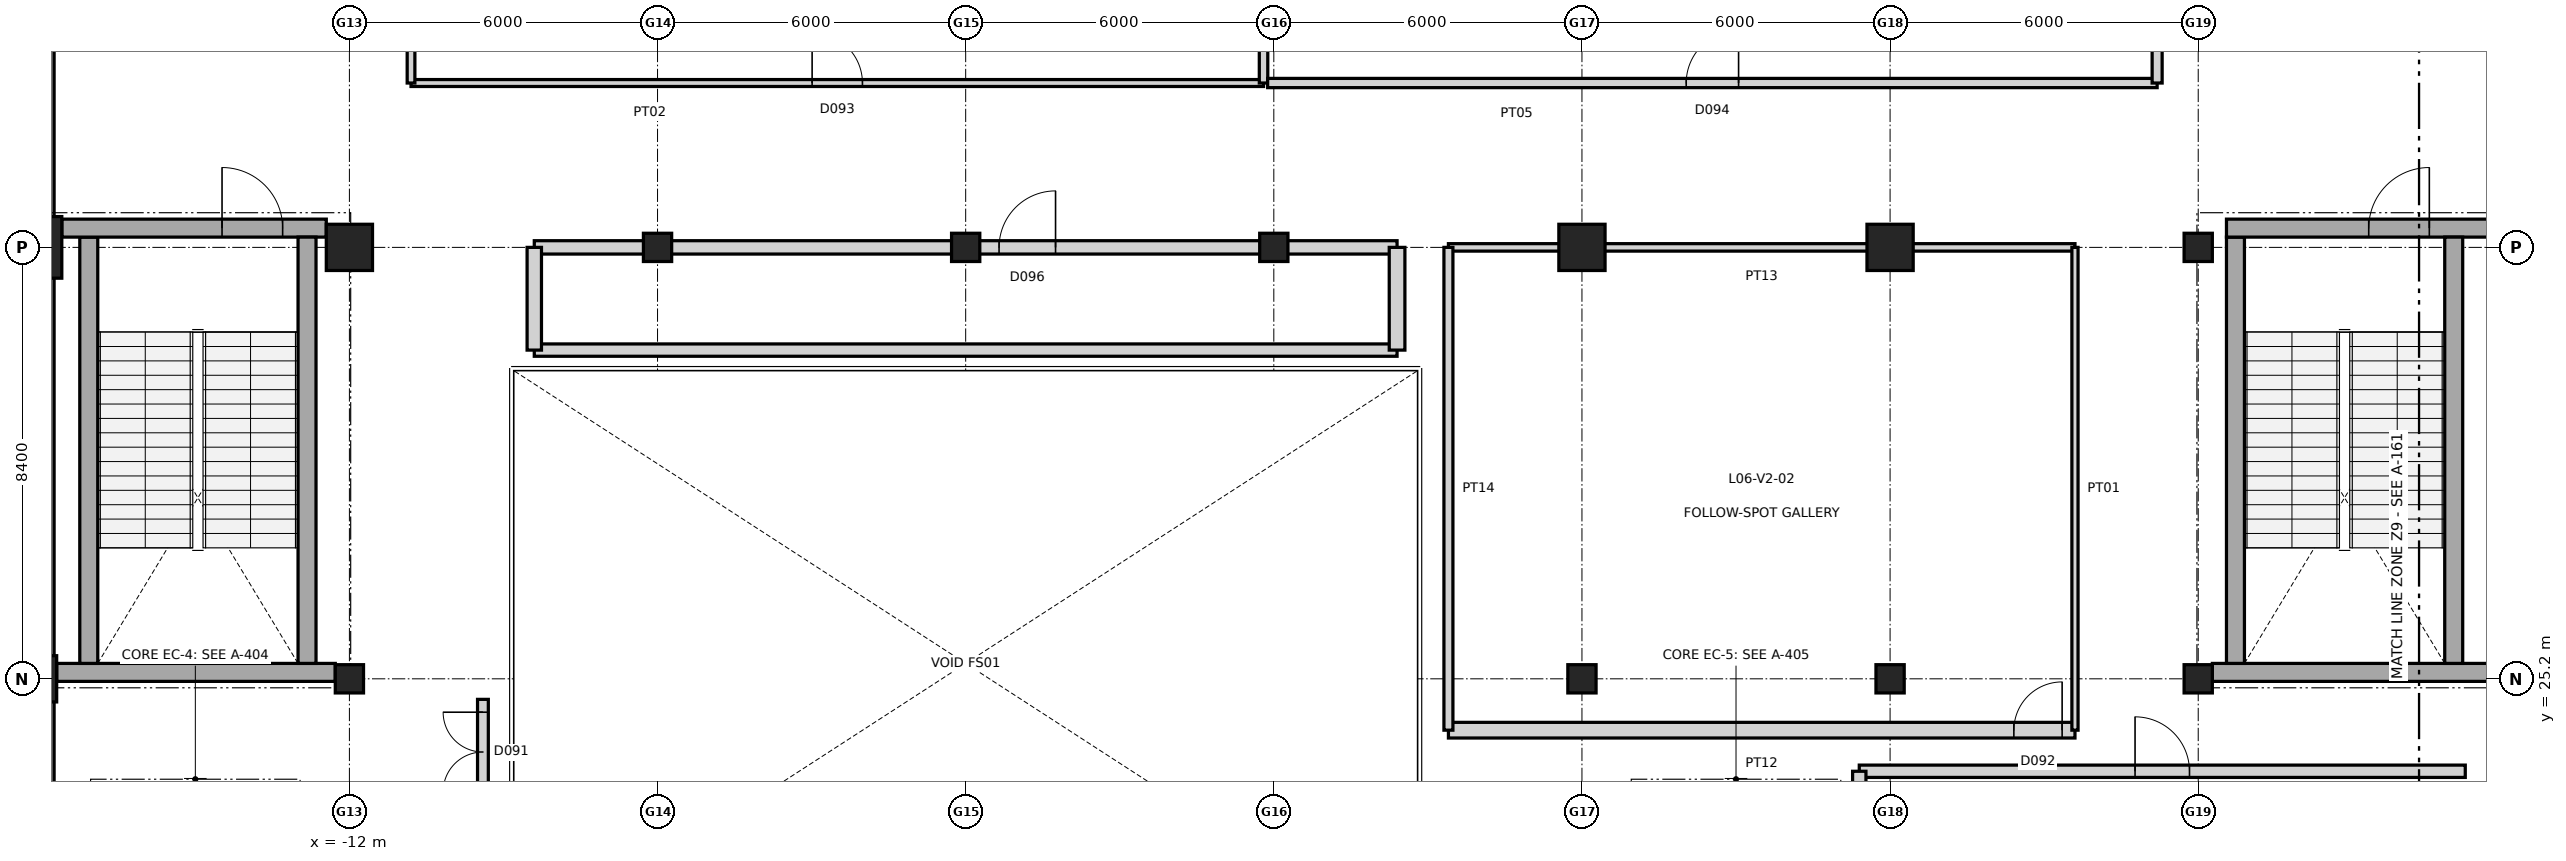
"""IFC4 building model, lengths in metres.
Left out: names, types, materials, properties, quantities, classifications, styles, units other than length and angle.
Written with IfcOpenShell. Run it as: python <this file> out.ifc"""

import sys

from ifc_helpers import new_model, si_unit, direction, frame, frame_2d, origin, origin_2d, place, context, subcontext, project, spatial, rectangle, extrude, element, fill, save


model = new_model("IFC4")
c1 = context("Model", 3, precision=1e-05, world=origin(), true_north=direction((0.0, 1.0)))
c2 = subcontext(c1, "Body", "Model", "MODEL_VIEW")
j1 = project(units=[si_unit("LENGTHUNIT", "METRE"), si_unit("PLANEANGLEUNIT", "RADIAN")], contexts=[c1])
p1 = place(None, origin())
s1 = spatial("IfcSite", under=j1, at=p1, CompositionType="ELEMENT")
p2 = place(p1, origin())
s2 = spatial("IfcBuilding", under=s1, at=p2, CompositionType="ELEMENT")
p3 = place(p2, frame((0.0, 0.0, 30.0)))
s3 = spatial("IfcBuildingStorey", under=s2, at=p3, CompositionType="ELEMENT", Elevation=30.0)
p4 = place(p3, frame((-18.0, 25.2, 0.0), z_axis=(0.0, 0.0, 1.0), x_axis=(1.0, 0.0, 0.0)))
e1 = element("IfcColumn", 1, at=p4, inside=s3, PredefinedType="COLUMN", context=c2, shape_type="SweptSolid", body=[
    extrude(rectangle(XDim=0.6, YDim=0.9, at=origin_2d()), origin(), (0.0, 0.0, 1.0), 6.0),
])
p5 = place(p3, frame((-18.0, 33.6, 0.0), z_axis=(0.0, 0.0, 1.0), x_axis=(1.0, 0.0, 0.0)))
e2 = element("IfcColumn", 2, at=p5, inside=s3, PredefinedType="COLUMN", context=c2, shape_type="SweptSolid", body=[
    extrude(rectangle(XDim=0.8, YDim=1.2, at=origin_2d()), origin(), (0.0, 0.0, 1.0), 6.0),
])
p6 = place(p3, frame((-12.0, 25.2, 0.0), z_axis=(0.0, 0.0, 1.0), x_axis=(1.0, 0.0, 0.0)))
e3 = element("IfcColumn", 3, at=p6, inside=s3, PredefinedType="COLUMN", context=c2, shape_type="SweptSolid", body=[
    extrude(rectangle(XDim=0.55, YDim=0.55, at=origin_2d()), origin(), (0.0, 0.0, 1.0), 6.0),
])
p7 = place(p3, frame((-12.0, 33.6, 0.0), z_axis=(0.0, 0.0, 1.0), x_axis=(1.0, 0.0, 0.0)))
e4 = element("IfcColumn", 4, at=p7, inside=s3, PredefinedType="COLUMN", context=c2, shape_type="SweptSolid", body=[
    extrude(rectangle(XDim=0.9, YDim=0.9, at=origin_2d()), origin(), (0.0, 0.0, 1.0), 6.0),
])
for number, where, z_axis, x_axis in (
    (5, (-6.0, 33.6, 0.0), (0.0, 0.0, 1.0), (1.0, 0.0, 0.0)),
    (6, (0.0, 33.6, 0.0), (0.0, 0.0, 1.0), (1.0, 0.0, 0.0)),
    (7, (6.0, 33.6, 0.0), (0.0, 0.0, 1.0), (1.0, 0.0, 0.0)),
    (8, (12.0, 25.2, 0.0), (0.0, 0.0, 1.0), (1.0, 0.0, 0.0)),
):
    element("IfcColumn", number, at=place(p3, frame(where, z_axis=z_axis, x_axis=x_axis)), inside=s3, PredefinedType="COLUMN", context=c2, shape_type="SweptSolid", body=[
        extrude(rectangle(XDim=0.55, YDim=0.55, at=origin_2d()), origin(), (0.0, 0.0, 1.0), 6.0),
    ])
p8 = place(p3, frame((12.0, 33.6, 0.0), z_axis=(0.0, 0.0, 1.0), x_axis=(1.0, 0.0, 0.0)))
e9 = element("IfcColumn", 9, at=p8, inside=s3, PredefinedType="COLUMN", context=c2, shape_type="SweptSolid", body=[
    extrude(rectangle(XDim=0.9, YDim=0.9, at=origin_2d()), origin(), (0.0, 0.0, 1.0), 6.0),
])
p9 = place(p3, frame((18.0, 25.2, 0.0), z_axis=(0.0, 0.0, 1.0), x_axis=(1.0, 0.0, 0.0)))
e10 = element("IfcColumn", 10, at=p9, inside=s3, PredefinedType="COLUMN", context=c2, shape_type="SweptSolid", body=[
    extrude(rectangle(XDim=0.55, YDim=0.55, at=origin_2d()), origin(), (0.0, 0.0, 1.0), 6.0),
])
p10 = place(p3, frame((18.0, 33.6, 0.0), z_axis=(0.0, 0.0, 1.0), x_axis=(1.0, 0.0, 0.0)))
e11 = element("IfcColumn", 11, at=p10, inside=s3, PredefinedType="COLUMN", context=c2, shape_type="SweptSolid", body=[
    extrude(rectangle(XDim=0.9, YDim=0.9, at=origin_2d()), origin(), (0.0, 0.0, 1.0), 6.0),
])
for number, where, z_axis, x_axis in (
    (12, (24.0, 25.2, 0.0), (0.0, 0.0, 1.0), (1.0, 0.0, 0.0)),
    (13, (24.0, 33.6, 0.0), (0.0, 0.0, 1.0), (1.0, 0.0, 0.0)),
):
    element("IfcColumn", number, at=place(p3, frame(where, z_axis=z_axis, x_axis=x_axis)), inside=s3, PredefinedType="COLUMN", context=c2, shape_type="SweptSolid", body=[
        extrude(rectangle(XDim=0.55, YDim=0.55, at=origin_2d()), origin(), (0.0, 0.0, 1.0), 6.0),
    ])
p11 = place(p3, frame((-18.0, 18.0, 0.0), z_axis=(0.0, 0.0, 1.0), x_axis=(0.0, 1.0, 0.0)))
e14 = element("IfcWall", 14, at=p11, inside=s3, PredefinedType="SHEAR", context=c2, shape_type="SweptSolid", body=[
    extrude(rectangle(XDim=23.55, YDim=0.5, at=frame_2d((11.775, 0.0))), origin(), (0.0, 0.0, 1.0), 6.0),
])
p12 = place(p3, frame((-12.275, 25.325, 0.0), z_axis=(0.0, 0.0, 1.0), x_axis=(-1.0, 0.0, 0.0)))
e15 = element("IfcWall", 15, at=p12, inside=s3, PredefinedType="SHEAR", context=c2, shape_type="SweptSolid", body=[
    extrude(rectangle(XDim=5.425, YDim=0.35, at=frame_2d((2.712, 0.0))), origin(), (0.0, 0.0, 1.0), 6.0),
])
p13 = place(p3, frame((-17.075, 25.5, 0.0), z_axis=(0.0, 0.0, 1.0), x_axis=(0.0, 1.0, 0.0)))
e16 = element("IfcWall", 16, at=p13, inside=s3, PredefinedType="SHEAR", context=c2, shape_type="SweptSolid", body=[
    extrude(rectangle(XDim=8.3, YDim=0.35, at=frame_2d((4.15, 0.0))), origin(), (0.0, 0.0, 1.0), 6.0),
])
p14 = place(p3, frame((-17.6, 33.975, 0.0), z_axis=(0.0, 0.0, 1.0), x_axis=(1.0, 0.0, 0.0)))
e17 = element("IfcWall", 17, at=p14, inside=s3, PredefinedType="SHEAR", context=c2, shape_type="SweptSolid", body=[
    extrude(rectangle(XDim=5.15, YDim=0.35, at=frame_2d((2.575, 0.0))), origin(), (0.0, 0.0, 1.0), 6.0),
])
p15 = place(p14, frame((3.12, 0.0, 0.0)))
e18 = element("IfcOpeningElement", 18, at=p15, cuts=e17, PredefinedType="OPENING", context=c2, shape_type="SweptSolid", body=[
    extrude(rectangle(XDim=1.18, YDim=2.15, at=frame_2d((0.59, 1.075))), frame((0.0, 0.185, 0.0), z_axis=(0.0, -1.0, 0.0), x_axis=(1.0, 0.0, 0.0)), (0.0, 0.0, 1.0), 0.37),
])
p16 = place(p3, frame((-12.825, 33.8, 0.0), z_axis=(0.0, 0.0, 1.0), x_axis=(0.0, -1.0, 0.0)))
e19 = element("IfcWall", 19, at=p16, inside=s3, PredefinedType="SHEAR", context=c2, shape_type="SweptSolid", body=[
    extrude(rectangle(XDim=8.3, YDim=0.35, at=frame_2d((4.15, 0.0))), origin(), (0.0, 0.0, 1.0), 6.0),
])
p17 = place(p3, frame((29.7, 25.325, 0.0), z_axis=(0.0, 0.0, 1.0), x_axis=(-1.0, 0.0, 0.0)))
e20 = element("IfcWall", 20, at=p17, inside=s3, PredefinedType="SHEAR", context=c2, shape_type="SweptSolid", body=[
    extrude(rectangle(XDim=5.425, YDim=0.35, at=frame_2d((2.712, 0.0))), origin(), (0.0, 0.0, 1.0), 6.0),
])
p18 = place(p3, frame((24.725, 25.5, 0.0), z_axis=(0.0, 0.0, 1.0), x_axis=(0.0, 1.0, 0.0)))
e21 = element("IfcWall", 21, at=p18, inside=s3, PredefinedType="SHEAR", context=c2, shape_type="SweptSolid", body=[
    extrude(rectangle(XDim=8.3, YDim=0.35, at=frame_2d((4.15, 0.0))), origin(), (0.0, 0.0, 1.0), 6.0),
])
p19 = place(p3, frame((24.55, 33.975, 0.0), z_axis=(0.0, 0.0, 1.0), x_axis=(1.0, 0.0, 0.0)))
e22 = element("IfcWall", 22, at=p19, inside=s3, PredefinedType="SHEAR", context=c2, shape_type="SweptSolid", body=[
    extrude(rectangle(XDim=5.15, YDim=0.35, at=frame_2d((2.575, 0.0))), origin(), (0.0, 0.0, 1.0), 6.0),
])
p20 = place(p19, frame((2.77, 0.0, 0.0)))
e23 = element("IfcOpeningElement", 23, at=p20, cuts=e22, PredefinedType="OPENING", context=c2, shape_type="SweptSolid", body=[
    extrude(rectangle(XDim=1.18, YDim=2.15, at=frame_2d((0.59, 1.075))), frame((0.0, 0.185, 0.0), z_axis=(0.0, -1.0, 0.0), x_axis=(1.0, 0.0, 0.0)), (0.0, 0.0, 1.0), 0.37),
])
p21 = place(p3, frame((28.975, 33.8, 0.0), z_axis=(0.0, 0.0, 1.0), x_axis=(0.0, -1.0, 0.0)))
e24 = element("IfcWall", 24, at=p21, inside=s3, PredefinedType="SHEAR", context=c2, shape_type="SweptSolid", body=[
    extrude(rectangle(XDim=8.3, YDim=0.35, at=frame_2d((4.15, 0.0))), origin(), (0.0, 0.0, 1.0), 6.0),
])
p22 = place(p3, frame((-9.4, 18.2, 0.0), z_axis=(0.0, 0.0, 1.0), x_axis=(0.0, 1.0, 0.0)))
e25 = element("IfcWall", 25, at=p22, inside=s3, PredefinedType="PARTITIONING", context=c2, shape_type="SweptSolid", body=[
    extrude(rectangle(XDim=6.6, YDim=0.21, at=frame_2d((3.3, 0.0))), origin(), (0.0, 0.0, 1.0), 5.62),
])
p23 = place(p22, frame((4.8, 0.0, 0.0)))
e26 = element("IfcOpeningElement", 26, at=p23, cuts=e25, PredefinedType="OPENING", context=c2, shape_type="SweptSolid", body=[
    extrude(rectangle(XDim=1.55, YDim=2.2, at=frame_2d((0.775, 1.1))), frame((0.0, 0.115, 0.0), z_axis=(0.0, -1.0, 0.0), x_axis=(1.0, 0.0, 0.0)), (0.0, 0.0, 1.0), 0.23),
])
p24 = place(p3, frame((9.4, 24.2, 0.0), z_axis=(0.0, 0.0, 1.0), x_axis=(1.0, 0.0, 0.0)))
e27 = element("IfcWall", 27, at=p24, inside=s3, PredefinedType="PARTITIONING", context=c2, shape_type="SweptSolid", body=[
    extrude(rectangle(XDim=12.2, YDim=0.305, at=frame_2d((6.1, 0.0))), origin(), (0.0, 0.0, 1.0), 5.62),
])
p25 = place(p24, frame((11.01, 0.0, 0.0)))
e28 = element("IfcOpeningElement", 28, at=p25, cuts=e27, PredefinedType="OPENING", context=c2, shape_type="SweptSolid", body=[
    extrude(rectangle(XDim=0.94, YDim=2.1, at=frame_2d((0.47, 1.05))), frame((0.0, 0.162, 0.0), z_axis=(0.0, -1.0, 0.0), x_axis=(1.0, 0.0, 0.0)), (0.0, 0.0, 1.0), 0.325),
])
p26 = place(p3, frame((9.4, 33.6, 0.0), z_axis=(0.0, 0.0, 1.0), x_axis=(1.0, 0.0, 0.0)))
e29 = element("IfcWall", 29, at=p26, inside=s3, PredefinedType="PARTITIONING", context=c2, shape_type="SweptSolid", body=[
    extrude(rectangle(XDim=12.2, YDim=0.145, at=frame_2d((6.1, 0.0))), origin(), (0.0, 0.0, 1.0), 5.012),
])
p27 = place(p3, frame((9.4, 24.2, 0.0), z_axis=(0.0, 0.0, 1.0), x_axis=(0.0, 1.0, 0.0)))
e30 = element("IfcWall", 30, at=p27, inside=s3, PredefinedType="PARTITIONING", context=c2, shape_type="SweptSolid", body=[
    extrude(rectangle(XDim=9.4, YDim=0.175, at=frame_2d((4.7, 0.0))), origin(), (0.0, 0.0, 1.0), 5.62),
])
p28 = place(p3, frame((21.6, 24.2, 0.0), z_axis=(0.0, 0.0, 1.0), x_axis=(0.0, 1.0, 0.0)))
e31 = element("IfcWall", 31, at=p28, inside=s3, PredefinedType="PARTITIONING", context=c2, shape_type="SweptSolid", body=[
    extrude(rectangle(XDim=9.4, YDim=0.12, at=frame_2d((4.7, 0.0))), origin(), (0.0, 0.0, 1.0), 5.62),
])
p29 = place(p3, frame((-10.8, 36.8, 0.0), z_axis=(0.0, 0.0, 1.0), x_axis=(1.0, 0.0, 0.0)))
e32 = element("IfcWall", 32, at=p29, inside=s3, PredefinedType="PARTITIONING", context=c2, shape_type="SweptSolid", body=[
    extrude(rectangle(XDim=16.6, YDim=0.135, at=frame_2d((8.3, 0.0))), origin(), (0.0, 0.0, 1.0), 5.62),
])
p30 = place(p29, frame((7.81, 0.0, 0.0)))
e33 = element("IfcOpeningElement", 33, at=p30, cuts=e32, PredefinedType="OPENING", context=c2, shape_type="SweptSolid", body=[
    extrude(rectangle(XDim=0.98, YDim=2.15, at=frame_2d((0.49, 1.075))), frame((0.0, 0.077, 0.0), z_axis=(0.0, -1.0, 0.0), x_axis=(1.0, 0.0, 0.0)), (0.0, 0.0, 1.0), 0.155),
])
p31 = place(p3, frame((-10.8, 36.8, 0.0), z_axis=(0.0, 0.0, 1.0), x_axis=(0.0, 1.0, 0.0)))
e34 = element("IfcWall", 34, at=p31, inside=s3, PredefinedType="PARTITIONING", context=c2, shape_type="SweptSolid", body=[
    extrude(rectangle(XDim=4.4, YDim=0.15, at=frame_2d((2.2, 0.0))), origin(), (0.0, 0.0, 1.0), 5.62),
])
p32 = place(p3, frame((5.8, 36.8, 0.0), z_axis=(0.0, 0.0, 1.0), x_axis=(0.0, 1.0, 0.0)))
e35 = element("IfcWall", 35, at=p32, inside=s3, PredefinedType="PARTITIONING", context=c2, shape_type="SweptSolid", body=[
    extrude(rectangle(XDim=4.4, YDim=0.165, at=frame_2d((2.2, 0.0))), origin(), (0.0, 0.0, 1.0), 4.79),
])
p33 = place(p3, frame((5.88, 36.8, 0.0), z_axis=(0.0, 0.0, 1.0), x_axis=(1.0, 0.0, 0.0)))
e36 = element("IfcWall", 36, at=p33, inside=s3, PredefinedType="PARTITIONING", context=c2, shape_type="SweptSolid", body=[
    extrude(rectangle(XDim=17.32, YDim=0.18, at=frame_2d((8.66, 0.0))), origin(), (0.0, 0.0, 1.0), 5.62),
])
p34 = place(p33, frame((8.15, 0.0, 0.0)))
e37 = element("IfcOpeningElement", 37, at=p34, cuts=e36, PredefinedType="OPENING", context=c2, shape_type="SweptSolid", body=[
    extrude(rectangle(XDim=1.02, YDim=2.15, at=frame_2d((0.51, 1.075))), frame((0.0, 0.1, 0.0), z_axis=(0.0, -1.0, 0.0), x_axis=(1.0, 0.0, 0.0)), (0.0, 0.0, 1.0), 0.2),
])
p35 = place(p3, frame((23.2, 36.8, 0.0), z_axis=(0.0, 0.0, 1.0), x_axis=(0.0, 1.0, 0.0)))
e38 = element("IfcWall", 38, at=p35, inside=s3, PredefinedType="PARTITIONING", context=c2, shape_type="SweptSolid", body=[
    extrude(rectangle(XDim=4.4, YDim=0.195, at=frame_2d((2.2, 0.0))), origin(), (0.0, 0.0, 1.0), 5.62),
])
p36 = place(p3, frame((17.4, 23.4, 0.0), z_axis=(0.0, 0.0, 1.0), x_axis=(1.0, 0.0, 0.0)))
e39 = element("IfcWall", 39, at=p36, inside=s3, PredefinedType="PARTITIONING", context=c2, shape_type="SweptSolid", body=[
    extrude(rectangle(XDim=11.8, YDim=0.24, at=frame_2d((5.9, 0.0))), origin(), (0.0, 0.0, 1.0), 5.62),
])
p37 = place(p36, frame((5.37, 0.0, 0.0)))
e40 = element("IfcOpeningElement", 40, at=p37, cuts=e39, PredefinedType="OPENING", context=c2, shape_type="SweptSolid", body=[
    extrude(rectangle(XDim=1.06, YDim=2.15, at=frame_2d((0.53, 1.075))), frame((0.0, 0.13, 0.0), z_axis=(0.0, -1.0, 0.0), x_axis=(1.0, 0.0, 0.0)), (0.0, 0.0, 1.0), 0.26),
])
p38 = place(p3, frame((17.4, 18.2, 0.0), z_axis=(0.0, 0.0, 1.0), x_axis=(0.0, 1.0, 0.0)))
e41 = element("IfcWall", 41, at=p38, inside=s3, PredefinedType="PARTITIONING", context=c2, shape_type="SweptSolid", body=[
    extrude(rectangle(XDim=5.2, YDim=0.26, at=frame_2d((2.6, 0.0))), origin(), (0.0, 0.0, 1.0), 5.62),
])
p39 = place(p3, frame((-8.4, 31.6, 0.0), z_axis=(0.0, 0.0, 1.0), x_axis=(1.0, 0.0, 0.0)))
e42 = element("IfcWall", 42, at=p39, inside=s3, PredefinedType="PARTITIONING", context=c2, shape_type="SweptSolid", body=[
    extrude(rectangle(XDim=16.8, YDim=0.24, at=frame_2d((8.4, 0.0))), origin(), (0.0, 0.0, 1.0), 5.62),
])
p40 = place(p3, frame((-8.4, 33.6, 0.0), z_axis=(0.0, 0.0, 1.0), x_axis=(1.0, 0.0, 0.0)))
e43 = element("IfcWall", 43, at=p40, inside=s3, PredefinedType="PARTITIONING", context=c2, shape_type="SweptSolid", body=[
    extrude(rectangle(XDim=16.8, YDim=0.26, at=frame_2d((8.4, 0.0))), origin(), (0.0, 0.0, 1.0), 3.99),
])
p41 = place(p40, frame((9.05, 0.0, 0.0)))
e44 = element("IfcOpeningElement", 44, at=p41, cuts=e43, PredefinedType="OPENING", context=c2, shape_type="SweptSolid", body=[
    extrude(rectangle(XDim=1.1, YDim=2.2, at=frame_2d((0.55, 1.1))), frame((0.0, 0.14, 0.0), z_axis=(0.0, -1.0, 0.0), x_axis=(1.0, 0.0, 0.0)), (0.0, 0.0, 1.0), 0.28),
])
p42 = place(p3, frame((-8.4, 31.6, 0.0), z_axis=(0.0, 0.0, 1.0), x_axis=(0.0, 1.0, 0.0)))
e45 = element("IfcWall", 45, at=p42, inside=s3, PredefinedType="PARTITIONING", context=c2, shape_type="SweptSolid", body=[
    extrude(rectangle(XDim=2.0, YDim=0.28, at=frame_2d((1.0, 0.0))), origin(), (0.0, 0.0, 1.0), 5.62),
])
p43 = place(p3, frame((8.4, 31.6, 0.0), z_axis=(0.0, 0.0, 1.0), x_axis=(0.0, 1.0, 0.0)))
e46 = element("IfcWall", 46, at=p43, inside=s3, PredefinedType="PARTITIONING", context=c2, shape_type="SweptSolid", body=[
    extrude(rectangle(XDim=2.0, YDim=0.305, at=frame_2d((1.0, 0.0))), origin(), (0.0, 0.0, 1.0), 5.62),
])
p44 = place(p15, origin())
e47 = element("IfcDoor", 47, at=p44, inside=s3, OperationType="SINGLE_SWING_LEFT", PredefinedType="DOOR", context=c2, shape_type="SweptSolid", body=[
    extrude(rectangle(XDim=1.18, YDim=2.15, at=frame_2d((0.59, 1.075))), frame((0.0, 0.025, 0.0), z_axis=(0.0, -1.0, 0.0), x_axis=(1.0, 0.0, 0.0)), (0.0, 0.0, 1.0), 0.05),
])
fill(e18, e47)
p45 = place(p20, origin())
e48 = element("IfcDoor", 48, at=p45, inside=s3, OperationType="SINGLE_SWING_RIGHT", PredefinedType="DOOR", context=c2, shape_type="SweptSolid", body=[
    extrude(rectangle(XDim=1.18, YDim=2.15, at=frame_2d((0.59, 1.075))), frame((0.0, 0.025, 0.0), z_axis=(0.0, -1.0, 0.0), x_axis=(1.0, 0.0, 0.0)), (0.0, 0.0, 1.0), 0.05),
])
fill(e23, e48)
p46 = place(p23, origin())
e49 = element("IfcDoor", 49, at=p46, inside=s3, OperationType="DOUBLE_DOOR_SINGLE_SWING", PredefinedType="DOOR", context=c2, shape_type="SweptSolid", body=[
    extrude(rectangle(XDim=1.55, YDim=2.2, at=frame_2d((0.775, 1.1))), frame((0.0, 0.025, 0.0), z_axis=(0.0, -1.0, 0.0), x_axis=(1.0, 0.0, 0.0)), (0.0, 0.0, 1.0), 0.05),
])
fill(e26, e49)
p47 = place(p25, origin())
e50 = element("IfcDoor", 50, at=p47, inside=s3, OperationType="SINGLE_SWING_RIGHT", PredefinedType="DOOR", context=c2, shape_type="SweptSolid", body=[
    extrude(rectangle(XDim=0.94, YDim=2.1, at=frame_2d((0.47, 1.05))), frame((0.0, 0.025, 0.0), z_axis=(0.0, -1.0, 0.0), x_axis=(1.0, 0.0, 0.0)), (0.0, 0.0, 1.0), 0.05),
])
fill(e28, e50)
p48 = place(p30, origin())
e51 = element("IfcDoor", 51, at=p48, inside=s3, OperationType="SINGLE_SWING_LEFT", PredefinedType="DOOR", context=c2, shape_type="SweptSolid", body=[
    extrude(rectangle(XDim=0.98, YDim=2.15, at=frame_2d((0.49, 1.075))), frame((0.0, 0.025, 0.0), z_axis=(0.0, -1.0, 0.0), x_axis=(1.0, 0.0, 0.0)), (0.0, 0.0, 1.0), 0.05),
])
fill(e33, e51)
p49 = place(p34, origin())
e52 = element("IfcDoor", 52, at=p49, inside=s3, OperationType="SINGLE_SWING_RIGHT", PredefinedType="DOOR", context=c2, shape_type="SweptSolid", body=[
    extrude(rectangle(XDim=1.02, YDim=2.15, at=frame_2d((0.51, 1.075))), frame((0.0, 0.025, 0.0), z_axis=(0.0, -1.0, 0.0), x_axis=(1.0, 0.0, 0.0)), (0.0, 0.0, 1.0), 0.05),
])
fill(e37, e52)
p50 = place(p37, origin())
e53 = element("IfcDoor", 53, at=p50, inside=s3, OperationType="SINGLE_SWING_LEFT", PredefinedType="DOOR", context=c2, shape_type="SweptSolid", body=[
    extrude(rectangle(XDim=1.06, YDim=2.15, at=frame_2d((0.53, 1.075))), frame((0.0, 0.025, 0.0), z_axis=(0.0, -1.0, 0.0), x_axis=(1.0, 0.0, 0.0)), (0.0, 0.0, 1.0), 0.05),
])
fill(e40, e53)
p51 = place(p41, origin())
e54 = element("IfcDoor", 54, at=p51, inside=s3, OperationType="SINGLE_SWING_RIGHT", PredefinedType="DOOR", context=c2, shape_type="SweptSolid", body=[
    extrude(rectangle(XDim=1.1, YDim=2.2, at=frame_2d((0.55, 1.1))), frame((0.0, 0.025, 0.0), z_axis=(0.0, -1.0, 0.0), x_axis=(1.0, 0.0, 0.0)), (0.0, 0.0, 1.0), 0.05),
])
fill(e44, e54)
save(model, sys.argv[1])
